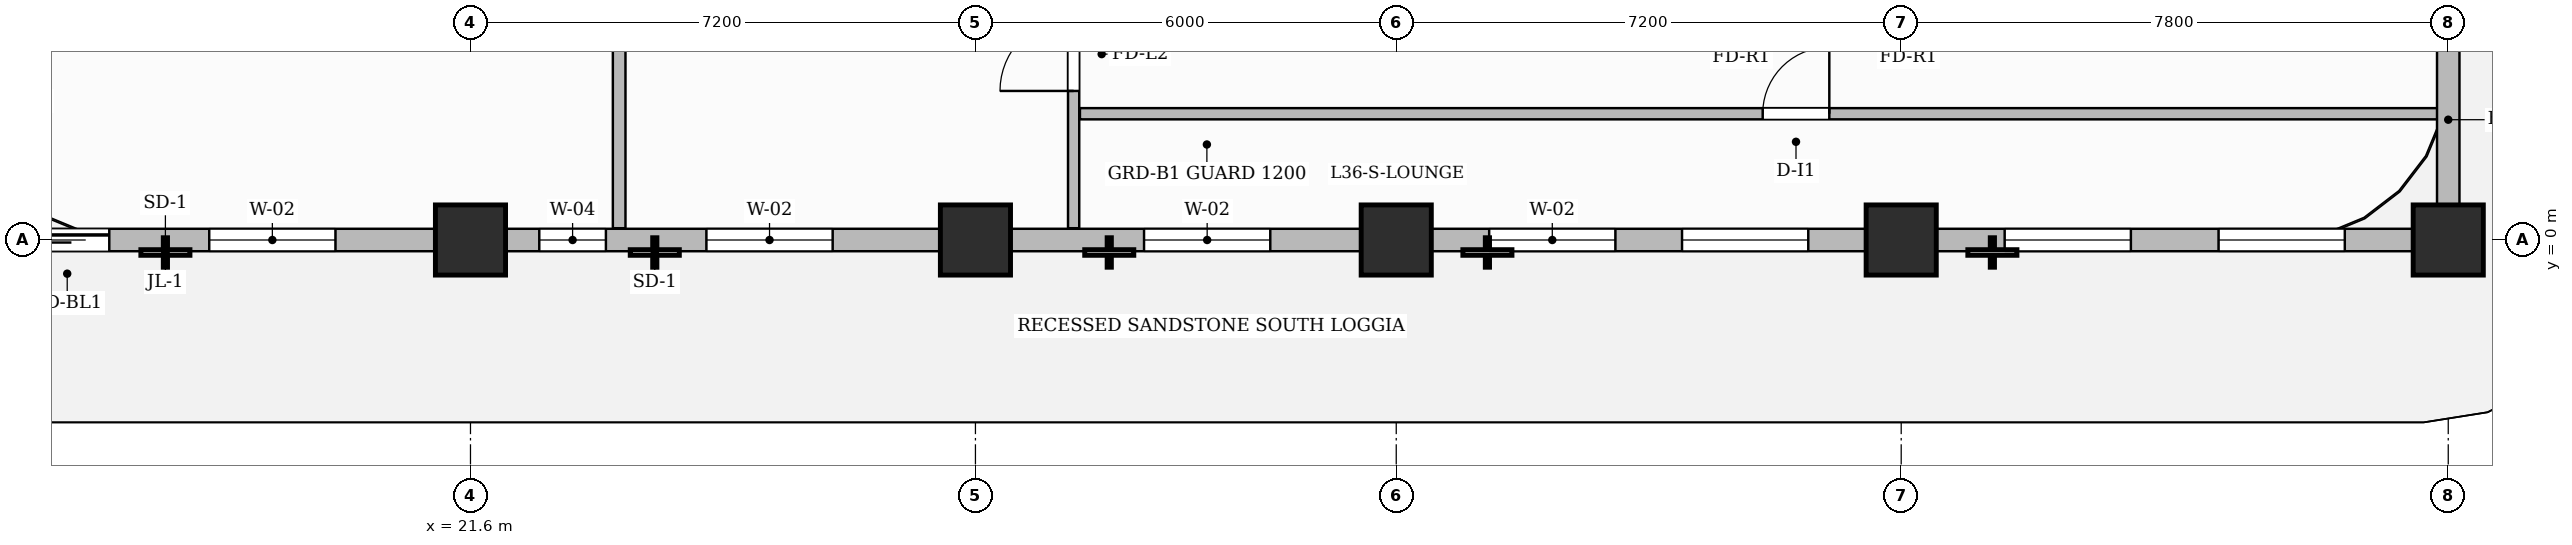
"""IFC4 building model, lengths in metres.
Left out: names, types, materials, properties, quantities, classifications, styles, units other than length and angle.
Written with IfcOpenShell. Run it as: python <this file> out.ifc"""

import sys

from ifc_helpers import new_model, si_unit, direction, frame, frame_2d, origin, origin_2d, place, context, subcontext, project, spatial, rectangle, extrude, source, transform, mapped, element, fill, save


model = new_model("IFC4")
c1 = context("Model", 3, precision=1e-05, world=origin(), true_north=direction((0.0, 1.0)))
c2 = subcontext(c1, "Body", "Model", "MODEL_VIEW")
j1 = project(units=[si_unit("LENGTHUNIT", "METRE"), si_unit("PLANEANGLEUNIT", "RADIAN")], contexts=[c1])
p1 = place(None, origin())
s1 = spatial("IfcSite", under=j1, at=p1, CompositionType="ELEMENT")
p2 = place(p1, origin())
s2 = spatial("IfcBuilding", under=s1, at=p2, CompositionType="ELEMENT")
p3 = place(p2, frame((0.0, 0.0, 145.1)))
s3 = spatial("IfcBuildingStorey", under=s2, at=p3, CompositionType="ELEMENT", Elevation=145.1)
m1 = source(origin(), c2, "Body", "SweptSolid", [
    extrude(rectangle(XDim=1.0, YDim=1.0, at=origin_2d()), origin(), (0.0, 0.0, 1.0), 5.2),
])
for number, where, z_axis, x_axis in (
    (1, (21.6, 0.0, 0.0), (0.0, 0.0, 1.0), (1.0, 0.0, 0.0)),
    (2, (28.8, 0.0, 0.0), (0.0, 0.0, 1.0), (1.0, 0.0, 0.0)),
    (3, (34.8, 0.0, 0.0), (0.0, 0.0, 1.0), (1.0, 0.0, 0.0)),
    (4, (42.0, 0.0, 0.0), (0.0, 0.0, 1.0), (1.0, 0.0, 0.0)),
    (5, (49.8, 0.0, 0.0), (0.0, 0.0, 1.0), (1.0, 0.0, 0.0)),
):
    element("IfcColumn", number, at=place(p3, frame(where, z_axis=z_axis, x_axis=x_axis)), inside=s3, PredefinedType="COLUMN", context=c2, shape_type="MappedRepresentation", body=[
        mapped(m1, transform((0.0, 0.0, 0.0), scale=1.0)),
    ])
p4 = place(p3, frame((30.2, 0.168, 0.0), z_axis=(0.0, 0.0, 1.0), x_axis=(0.0, 1.0, 0.0)))
e6 = element("IfcWall", 6, at=p4, inside=s3, PredefinedType="PARTITIONING", context=c2, shape_type="SweptSolid", body=[
    extrude(rectangle(XDim=9.092, YDim=0.16, at=frame_2d((4.546, 0.0))), origin(), (0.0, 0.0, 1.0), 4.95),
])
p5 = place(p4, frame((1.957, 0.0, 0.0)))
e7 = element("IfcOpeningElement", 7, at=p5, cuts=e6, PredefinedType="OPENING", context=c2, shape_type="SweptSolid", body=[
    extrude(rectangle(XDim=1.05, YDim=2.15, at=frame_2d((0.525, 1.075))), frame((0.0, 0.09, 0.0), z_axis=(0.0, -1.0, 0.0), x_axis=(1.0, 0.0, 0.0)), (0.0, 0.0, 1.0), 0.18),
])
p6 = place(p3, frame((30.29, 1.8, 0.0), z_axis=(0.0, 0.0, 1.0), x_axis=(1.0, 0.0, 0.0)))
e8 = element("IfcWall", 8, at=p6, inside=s3, PredefinedType="PARTITIONING", context=c2, shape_type="SweptSolid", body=[
    extrude(rectangle(XDim=19.37, YDim=0.16, at=frame_2d((9.685, 0.0))), origin(), (0.0, 0.0, 1.0), 4.95),
])
p7 = place(p6, frame((9.735, 0.0, 0.0)))
e9 = element("IfcOpeningElement", 9, at=p7, cuts=e8, PredefinedType="OPENING", context=c2, shape_type="SweptSolid", body=[
    extrude(rectangle(XDim=0.95, YDim=2.15, at=frame_2d((0.475, 1.075))), frame((0.0, 0.09, 0.0), z_axis=(0.0, -1.0, 0.0), x_axis=(1.0, 0.0, 0.0)), (0.0, 0.0, 1.0), 0.18),
])
p8 = place(p3, frame((23.72, 0.168, 0.0), z_axis=(0.0, 0.0, 1.0), x_axis=(0.0, 1.0, 0.0)))
e10 = element("IfcWall", 10, at=p8, inside=s3, PredefinedType="PARTITIONING", context=c2, shape_type="SweptSolid", body=[
    extrude(rectangle(XDim=9.092, YDim=0.18, at=frame_2d((4.546, 0.0))), origin(), (0.0, 0.0, 1.0), 4.95),
])
p9 = place(p3, frame((14.4, 0.0, 0.0), z_axis=(0.0, 0.0, 1.0), x_axis=(1.0, 0.0, 0.0)))
e11 = element("IfcWall", 11, at=p9, inside=s3, PredefinedType="SOLIDWALL", context=c2, shape_type="SweptSolid", body=[
    extrude(rectangle(XDim=35.4, YDim=0.32, at=frame_2d((17.7, 0.0))), origin(), (0.0, 0.0, 1.0), 4.335),
])
p10 = place(p9, frame((0.85, 0.0, 0.0)))
e12 = element("IfcOpeningElement", 12, at=p10, cuts=e11, PredefinedType="OPENING", context=c2, shape_type="SweptSolid", body=[
    extrude(rectangle(XDim=1.2, YDim=2.2, at=frame_2d((0.6, 1.1))), frame((0.0, 0.17, 0.0), z_axis=(0.0, -1.0, 0.0), x_axis=(1.0, 0.0, 0.0)), (0.0, 0.0, 1.0), 0.34),
])
p11 = place(p9, frame((3.475, 0.0, 0.8)))
e13 = element("IfcOpeningElement", 13, at=p11, cuts=e11, PredefinedType="OPENING", context=c2, shape_type="SweptSolid", body=[
    extrude(rectangle(XDim=1.8, YDim=1.85, at=frame_2d((0.9, 0.925))), frame((0.0, 0.17, 0.0), z_axis=(0.0, -1.0, 0.0), x_axis=(1.0, 0.0, 0.0)), (0.0, 0.0, 1.0), 0.34),
])
p12 = place(p9, frame((8.181, 0.0, 0.8)))
e14 = element("IfcOpeningElement", 14, at=p12, cuts=e11, PredefinedType="OPENING", context=c2, shape_type="SweptSolid", body=[
    extrude(rectangle(XDim=0.95, YDim=1.75, at=frame_2d((0.475, 0.875))), frame((0.0, 0.17, 0.0), z_axis=(0.0, -1.0, 0.0), x_axis=(1.0, 0.0, 0.0)), (0.0, 0.0, 1.0), 0.34),
])
p13 = place(p9, frame((10.564, 0.0, 0.8)))
e15 = element("IfcOpeningElement", 15, at=p13, cuts=e11, PredefinedType="OPENING", context=c2, shape_type="SweptSolid", body=[
    extrude(rectangle(XDim=1.8, YDim=1.85, at=frame_2d((0.9, 0.925))), frame((0.0, 0.17, 0.0), z_axis=(0.0, -1.0, 0.0), x_axis=(1.0, 0.0, 0.0)), (0.0, 0.0, 1.0), 0.34),
])
p14 = place(p9, frame((16.804, 0.0, 0.8)))
e16 = element("IfcOpeningElement", 16, at=p14, cuts=e11, PredefinedType="OPENING", context=c2, shape_type="SweptSolid", body=[
    extrude(rectangle(XDim=1.8, YDim=1.85, at=frame_2d((0.9, 0.925))), frame((0.0, 0.17, 0.0), z_axis=(0.0, -1.0, 0.0), x_axis=(1.0, 0.0, 0.0)), (0.0, 0.0, 1.0), 0.34),
])
p15 = place(p9, frame((21.725, 0.0, 0.8)))
e17 = element("IfcOpeningElement", 17, at=p15, cuts=e11, PredefinedType="OPENING", context=c2, shape_type="SweptSolid", body=[
    extrude(rectangle(XDim=1.8, YDim=1.85, at=frame_2d((0.9, 0.925))), frame((0.0, 0.17, 0.0), z_axis=(0.0, -1.0, 0.0), x_axis=(1.0, 0.0, 0.0)), (0.0, 0.0, 1.0), 0.34),
])
p16 = place(p9, frame((24.475, 0.0, 0.8)))
e18 = element("IfcOpeningElement", 18, at=p16, cuts=e11, PredefinedType="OPENING", context=c2, shape_type="SweptSolid", body=[
    extrude(rectangle(XDim=1.8, YDim=1.85, at=frame_2d((0.9, 0.925))), frame((0.0, 0.17, 0.0), z_axis=(0.0, -1.0, 0.0), x_axis=(1.0, 0.0, 0.0)), (0.0, 0.0, 1.0), 0.34),
])
p17 = place(p9, frame((29.075, 0.0, 0.8)))
e19 = element("IfcOpeningElement", 19, at=p17, cuts=e11, PredefinedType="OPENING", context=c2, shape_type="SweptSolid", body=[
    extrude(rectangle(XDim=1.8, YDim=1.85, at=frame_2d((0.9, 0.925))), frame((0.0, 0.17, 0.0), z_axis=(0.0, -1.0, 0.0), x_axis=(1.0, 0.0, 0.0)), (0.0, 0.0, 1.0), 0.34),
])
p18 = place(p9, frame((32.125, 0.0, 0.8)))
e20 = element("IfcOpeningElement", 20, at=p18, cuts=e11, PredefinedType="OPENING", context=c2, shape_type="SweptSolid", body=[
    extrude(rectangle(XDim=1.8, YDim=1.85, at=frame_2d((0.9, 0.925))), frame((0.0, 0.17, 0.0), z_axis=(0.0, -1.0, 0.0), x_axis=(1.0, 0.0, 0.0)), (0.0, 0.0, 1.0), 0.34),
])
p19 = place(p3, frame((49.8, 0.05, 0.0), z_axis=(0.0, 0.0, 1.0), x_axis=(0.0, 1.0, 0.0)))
e21 = element("IfcWall", 21, at=p19, inside=s3, PredefinedType="SOLIDWALL", context=c2, shape_type="SweptSolid", body=[
    extrude(rectangle(XDim=3.33, YDim=0.32, at=frame_2d((1.665, 0.0))), origin(), (0.0, 0.0, 1.0), 4.95),
])
m2 = source(origin(), c2, "Body", "SweptSolid", [
    extrude(rectangle(XDim=1.05, YDim=2.15, at=frame_2d((0.525, 1.075))), frame((0.0, 0.025, 0.0), z_axis=(0.0, -1.0, 0.0), x_axis=(1.0, 0.0, 0.0)), (0.0, 0.0, 1.0), 0.05),
])
p20 = place(p5, origin())
e22 = element("IfcDoor", 22, at=p20, inside=s3, OperationType="SINGLE_SWING_LEFT", PredefinedType="DOOR", context=c2, shape_type="MappedRepresentation", body=[
    mapped(m2, transform((0.0, 0.0, 0.0), scale=1.0)),
])
fill(e7, e22)
m3 = source(origin(), c2, "Body", "SweptSolid", [
    extrude(rectangle(XDim=0.95, YDim=2.15, at=frame_2d((0.475, 1.075))), frame((0.0, 0.025, 0.0), z_axis=(0.0, -1.0, 0.0), x_axis=(1.0, 0.0, 0.0)), (0.0, 0.0, 1.0), 0.05),
])
p21 = place(p7, origin())
e23 = element("IfcDoor", 23, at=p21, inside=s3, OperationType="SINGLE_SWING_RIGHT", PredefinedType="DOOR", context=c2, shape_type="MappedRepresentation", body=[
    mapped(m3, transform((0.0, 0.0, 0.0), scale=1.0)),
])
fill(e9, e23)
m4 = source(origin(), c2, "Body", "SweptSolid", [
    extrude(rectangle(XDim=1.2, YDim=2.2, at=frame_2d((0.6, 1.1))), frame((0.0, 0.025, 0.0), z_axis=(0.0, -1.0, 0.0), x_axis=(1.0, 0.0, 0.0)), (0.0, 0.0, 1.0), 0.05),
])
p22 = place(p10, origin())
e24 = element("IfcDoor", 24, at=p22, inside=s3, OperationType="SLIDING_TO_LEFT", PredefinedType="DOOR", context=c2, shape_type="MappedRepresentation", body=[
    mapped(m4, transform((0.0, 0.0, 0.0), scale=1.0)),
])
fill(e12, e24)
m5 = source(origin(), c2, "Body", "SweptSolid", [
    extrude(rectangle(XDim=1.8, YDim=1.85, at=frame_2d((0.9, 0.925))), frame((0.0, 0.03, 0.0), z_axis=(0.0, -1.0, 0.0), x_axis=(1.0, 0.0, 0.0)), (0.0, 0.0, 1.0), 0.06),
])
p23 = place(p11, origin())
e25 = element("IfcWindow", 25, at=p23, inside=s3, PartitioningType="DOUBLE_PANEL_VERTICAL", PredefinedType="WINDOW", context=c2, shape_type="MappedRepresentation", body=[
    mapped(m5, transform((0.0, 0.0, 0.0), scale=1.0)),
])
fill(e13, e25)
m6 = source(origin(), c2, "Body", "SweptSolid", [
    extrude(rectangle(XDim=0.95, YDim=1.75, at=frame_2d((0.475, 0.875))), frame((0.0, 0.03, 0.0), z_axis=(0.0, -1.0, 0.0), x_axis=(1.0, 0.0, 0.0)), (0.0, 0.0, 1.0), 0.06),
])
p24 = place(p12, origin())
e26 = element("IfcWindow", 26, at=p24, inside=s3, PartitioningType="SINGLE_PANEL", PredefinedType="WINDOW", context=c2, shape_type="MappedRepresentation", body=[
    mapped(m6, transform((0.0, 0.0, 0.0), scale=1.0)),
])
fill(e14, e26)
p25 = place(p13, origin())
e27 = element("IfcWindow", 27, at=p25, inside=s3, PartitioningType="DOUBLE_PANEL_VERTICAL", PredefinedType="WINDOW", context=c2, shape_type="MappedRepresentation", body=[
    mapped(m5, transform((0.0, 0.0, 0.0), scale=1.0)),
])
fill(e15, e27)
p26 = place(p14, origin())
e28 = element("IfcWindow", 28, at=p26, inside=s3, PartitioningType="DOUBLE_PANEL_VERTICAL", PredefinedType="WINDOW", context=c2, shape_type="MappedRepresentation", body=[
    mapped(m5, transform((0.0, 0.0, 0.0), scale=1.0)),
])
fill(e16, e28)
p27 = place(p15, origin())
e29 = element("IfcWindow", 29, at=p27, inside=s3, PartitioningType="DOUBLE_PANEL_VERTICAL", PredefinedType="WINDOW", context=c2, shape_type="MappedRepresentation", body=[
    mapped(m5, transform((0.0, 0.0, 0.0), scale=1.0)),
])
fill(e17, e29)
p28 = place(p16, origin())
e30 = element("IfcWindow", 30, at=p28, inside=s3, PartitioningType="DOUBLE_PANEL_VERTICAL", PredefinedType="WINDOW", context=c2, shape_type="MappedRepresentation", body=[
    mapped(m5, transform((0.0, 0.0, 0.0), scale=1.0)),
])
fill(e18, e30)
p29 = place(p17, origin())
e31 = element("IfcWindow", 31, at=p29, inside=s3, PartitioningType="DOUBLE_PANEL_VERTICAL", PredefinedType="WINDOW", context=c2, shape_type="MappedRepresentation", body=[
    mapped(m5, transform((0.0, 0.0, 0.0), scale=1.0)),
])
fill(e19, e31)
p30 = place(p18, origin())
e32 = element("IfcWindow", 32, at=p30, inside=s3, PartitioningType="DOUBLE_PANEL_VERTICAL", PredefinedType="WINDOW", context=c2, shape_type="MappedRepresentation", body=[
    mapped(m5, transform((0.0, 0.0, 0.0), scale=1.0)),
])
fill(e20, e32)
save(model, sys.argv[1])
